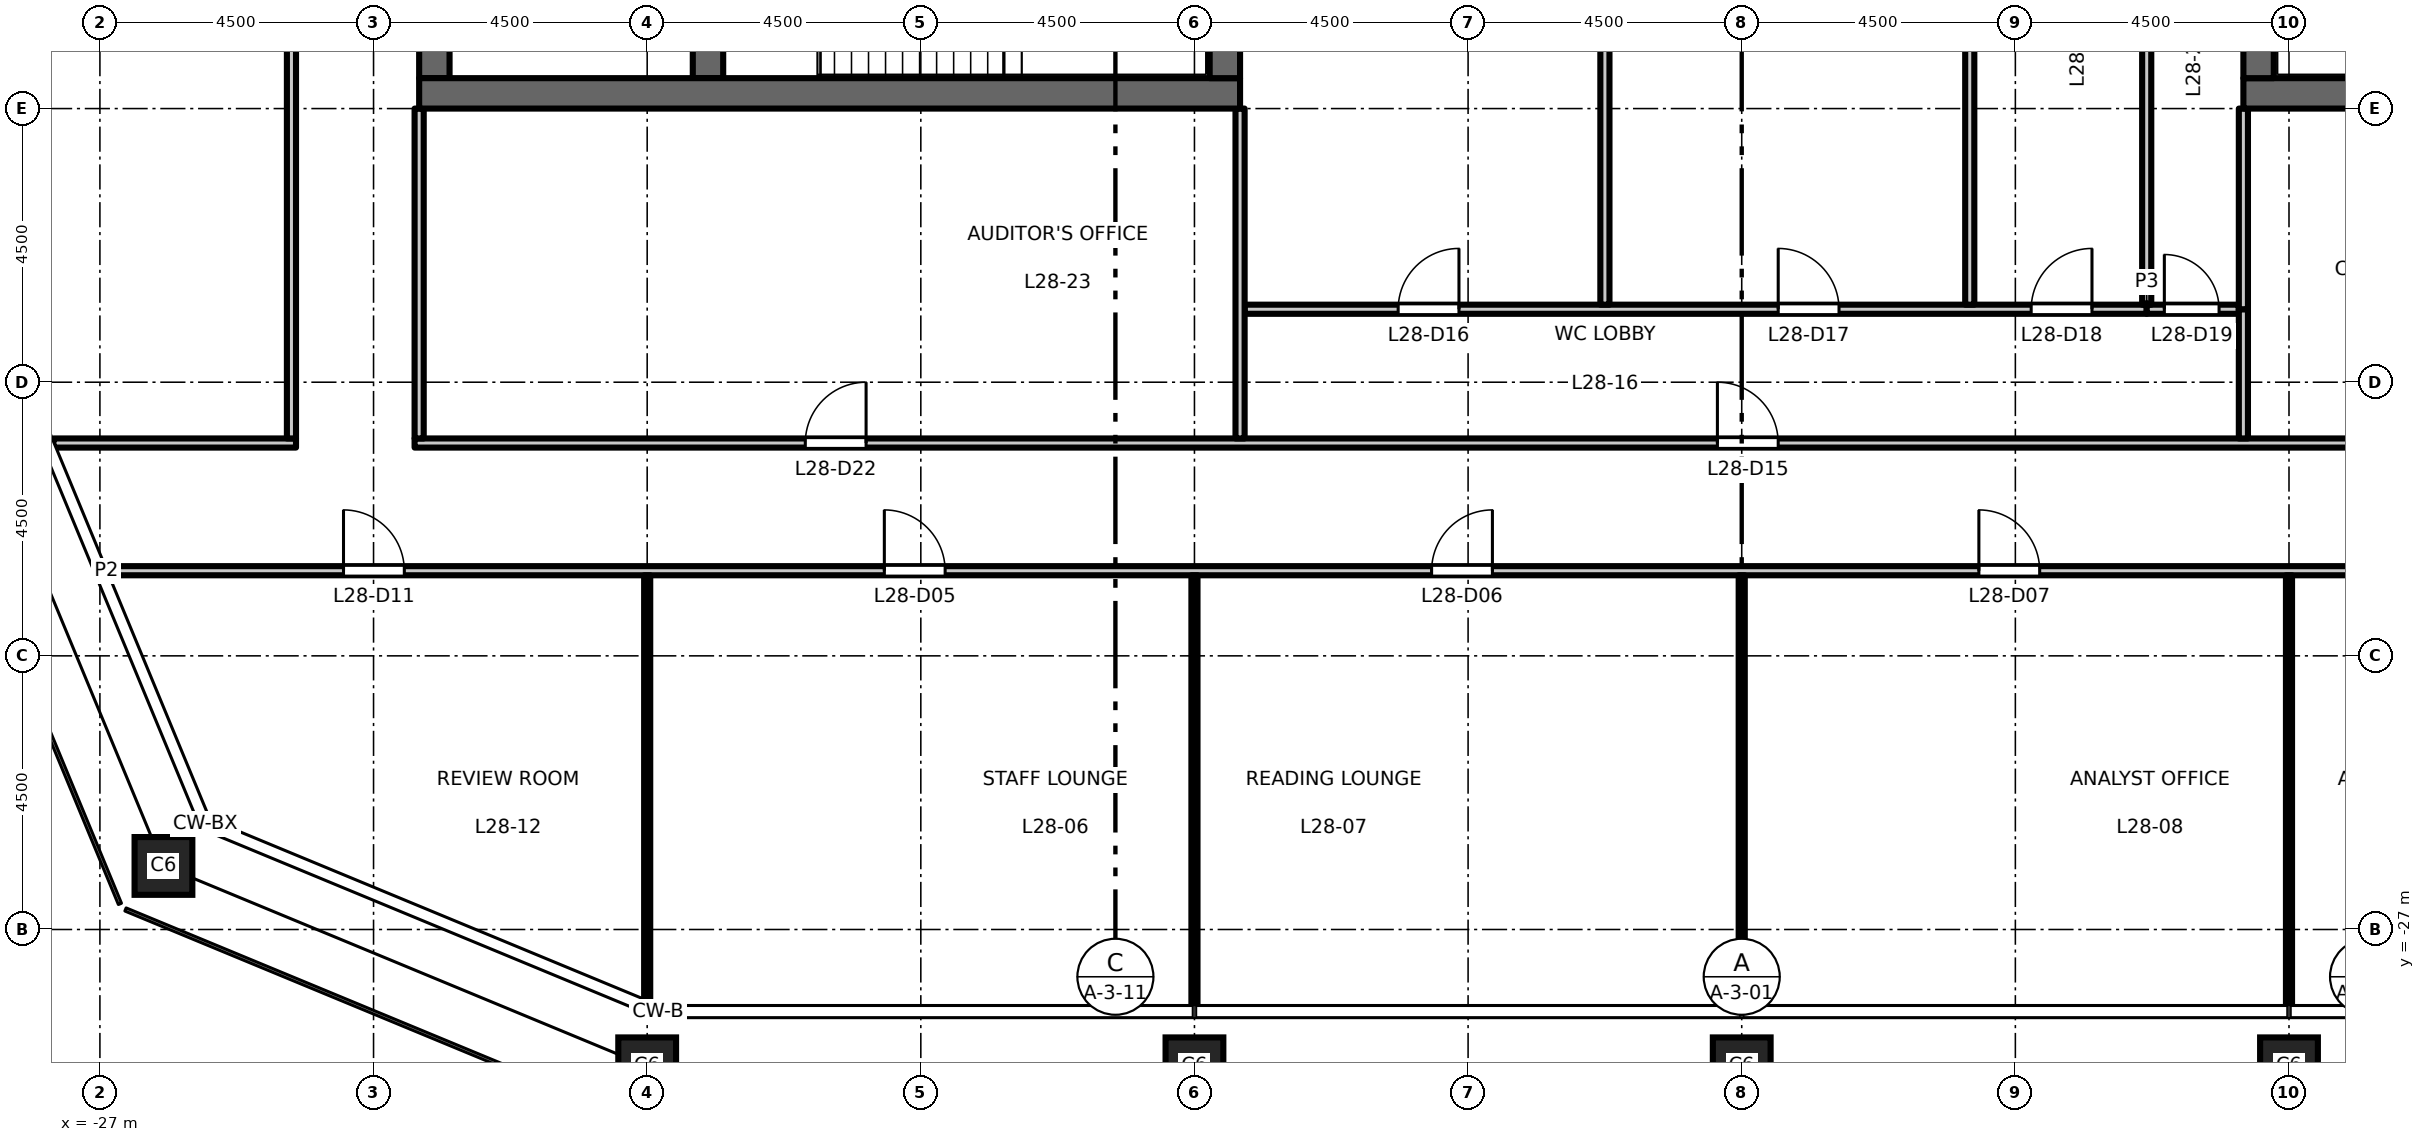
"""IFC4 building model, lengths in metres.
Left out: names, types, materials, properties, quantities, classifications, styles, units other than length and angle.
Written with IfcOpenShell. Run it as: python <this file> out.ifc"""

import sys

from ifc_helpers import new_model, si_unit, direction, frame, frame_2d, origin, origin_2d, place, context, subcontext, project, spatial, rectangle, hollow_rectangle, extrude, element, fill, save


model = new_model("IFC4")
c1 = context("Model", 3, precision=1e-05, world=origin(), true_north=direction((0.0, 1.0)))
c2 = subcontext(c1, "Body", "Model", "MODEL_VIEW")
j1 = project(units=[si_unit("LENGTHUNIT", "METRE"), si_unit("PLANEANGLEUNIT", "RADIAN")], contexts=[c1])
p1 = place(None, origin())
s1 = spatial("IfcSite", under=j1, at=p1, CompositionType="ELEMENT")
p2 = place(p1, origin())
s2 = spatial("IfcBuilding", under=s1, at=p2, CompositionType="ELEMENT")
p3 = place(p2, frame((0.0, 0.0, 131.7)))
s3 = spatial("IfcBuildingStorey", under=s2, at=p3, CompositionType="ELEMENT", Elevation=131.7)
for number, where, z_axis, x_axis in (
    (1, (-18.0, -29.25, 0.0), (0.0, 0.0, 1.0), (1.0, 0.0, 0.0)),
    (2, (-9.0, -29.25, 0.0), (0.0, 0.0, 1.0), (1.0, 0.0, 0.0)),
    (3, (0.0, -29.25, 0.0), (0.0, 0.0, 1.0), (1.0, 0.0, 0.0)),
    (4, (9.0, -29.25, 0.0), (0.0, 0.0, 1.0), (1.0, 0.0, 0.0)),
    (5, (-25.955, -25.955, 0.0), (0.0, 0.0, 1.0), (1.0, 0.0, 0.0)),
):
    element("IfcColumn", number, at=place(p3, frame(where, z_axis=z_axis, x_axis=x_axis)), inside=s3, PredefinedType="COLUMN", context=c2, shape_type="SweptSolid", body=[
        extrude(hollow_rectangle(XDim=0.95, YDim=0.95, WallThickness=0.055, at=origin_2d()), origin(), (0.0, 0.0, 1.0), 4.5),
    ])
p4 = place(p3, frame((-21.5, -13.0, 0.0), z_axis=(0.0, 0.0, 1.0), x_axis=(0.0, 1.0, 0.0)))
e6 = element("IfcWall", 6, at=p4, inside=s3, PredefinedType="SHEAR", context=c2, shape_type="SweptSolid", body=[
    extrude(rectangle(XDim=26.0, YDim=0.5, at=frame_2d((13.0, 0.0))), origin(), (0.0, 0.0, 1.0), 4.35),
])
p5 = place(p4, frame((16.825, 0.0, 0.0)))
e7 = element("IfcOpeningElement", 7, at=p5, cuts=e6, PredefinedType="OPENING", context=c2, shape_type="SweptSolid", body=[
    extrude(rectangle(XDim=1.8, YDim=2.1, at=frame_2d((0.9, 1.05))), frame((0.0, 0.26, 0.0), z_axis=(0.0, -1.0, 0.0), x_axis=(1.0, 0.0, 0.0)), (0.0, 0.0, 1.0), 0.52),
])
p6 = place(p4, frame((7.375, 0.0, 0.0)))
e8 = element("IfcOpeningElement", 8, at=p6, cuts=e6, PredefinedType="OPENING", context=c2, shape_type="SweptSolid", body=[
    extrude(rectangle(XDim=1.8, YDim=2.1, at=frame_2d((0.9, 1.05))), frame((0.0, 0.26, 0.0), z_axis=(0.0, -1.0, 0.0), x_axis=(1.0, 0.0, 0.0)), (0.0, 0.0, 1.0), 0.52),
])
p7 = place(p3, frame((-17.0, -13.0, 0.0), z_axis=(0.0, 0.0, 1.0), x_axis=(0.0, 1.0, 0.0)))
e9 = element("IfcWall", 9, at=p7, inside=s3, PredefinedType="SHEAR", context=c2, shape_type="SweptSolid", body=[
    extrude(rectangle(XDim=6.575, YDim=0.5, at=frame_2d((3.288, 0.0))), origin(), (0.0, 0.0, 1.0), 4.35),
])
p8 = place(p3, frame((-8.25, -13.25, 0.0), z_axis=(0.0, 0.0, 1.0), x_axis=(-1.0, 0.0, 0.0)))
e10 = element("IfcWall", 10, at=p8, inside=s3, PredefinedType="SHEAR", context=c2, shape_type="SweptSolid", body=[
    extrude(rectangle(XDim=13.5, YDim=0.5, at=frame_2d((6.75, 0.0))), origin(), (0.0, 0.0, 1.0), 4.35),
])
p9 = place(p3, frame((-8.5, -13.0, 0.0), z_axis=(0.0, 0.0, 1.0), x_axis=(0.0, 1.0, 0.0)))
e11 = element("IfcWall", 11, at=p9, inside=s3, PredefinedType="SHEAR", context=c2, shape_type="SweptSolid", body=[
    extrude(rectangle(XDim=26.0, YDim=0.5, at=frame_2d((13.0, 0.0))), origin(), (0.0, 0.0, 1.0), 4.35),
])
p10 = place(p3, frame((8.25, -13.25, 0.0), z_axis=(0.0, 0.0, 1.0), x_axis=(1.0, 0.0, 0.0)))
e12 = element("IfcWall", 12, at=p10, inside=s3, PredefinedType="SHEAR", context=c2, shape_type="SweptSolid", body=[
    extrude(rectangle(XDim=13.5, YDim=0.5, at=frame_2d((6.75, 0.0))), origin(), (0.0, 0.0, 1.0), 4.35),
])
p11 = place(p3, frame((8.5, -13.0, 0.0), z_axis=(0.0, 0.0, 1.0), x_axis=(0.0, 1.0, 0.0)))
e13 = element("IfcWall", 13, at=p11, inside=s3, PredefinedType="SHEAR", context=c2, shape_type="SweptSolid", body=[
    extrude(rectangle(XDim=26.0, YDim=0.5, at=frame_2d((13.0, 0.0))), origin(), (0.0, 0.0, 1.0), 4.35),
])
p12 = place(p3, frame((-26.894, -21.1, 0.0), z_axis=(0.0, 0.0, 1.0), x_axis=(1.0, 0.0, 0.0)))
e14 = element("IfcWall", 14, at=p12, inside=s3, PredefinedType="PARTITIONING", context=c2, shape_type="SweptSolid", body=[
    extrude(rectangle(XDim=53.788, YDim=0.15, at=frame_2d((26.894, 0.0))), origin(), (0.0, 0.0, 1.0), 4.35),
])
p13 = place(p12, frame((12.794, 0.0, 0.0)))
e15 = element("IfcOpeningElement", 15, at=p13, cuts=e14, PredefinedType="OPENING", context=c2, shape_type="SweptSolid", body=[
    extrude(rectangle(XDim=1.0, YDim=2.1, at=frame_2d((0.5, 1.05))), frame((0.0, 0.085, 0.0), z_axis=(0.0, -1.0, 0.0), x_axis=(1.0, 0.0, 0.0)), (0.0, 0.0, 1.0), 0.17),
])
p14 = place(p12, frame((21.794, 0.0, 0.0)))
e16 = element("IfcOpeningElement", 16, at=p14, cuts=e14, PredefinedType="OPENING", context=c2, shape_type="SweptSolid", body=[
    extrude(rectangle(XDim=1.0, YDim=2.1, at=frame_2d((0.5, 1.05))), frame((0.0, 0.085, 0.0), z_axis=(0.0, -1.0, 0.0), x_axis=(1.0, 0.0, 0.0)), (0.0, 0.0, 1.0), 0.17),
])
p15 = place(p12, frame((30.794, 0.0, 0.0)))
e17 = element("IfcOpeningElement", 17, at=p15, cuts=e14, PredefinedType="OPENING", context=c2, shape_type="SweptSolid", body=[
    extrude(rectangle(XDim=1.0, YDim=2.1, at=frame_2d((0.5, 1.05))), frame((0.0, 0.085, 0.0), z_axis=(0.0, -1.0, 0.0), x_axis=(1.0, 0.0, 0.0)), (0.0, 0.0, 1.0), 0.17),
])
p16 = place(p12, frame((39.794, 0.0, 0.0)))
e18 = element("IfcOpeningElement", 18, at=p16, cuts=e14, PredefinedType="OPENING", context=c2, shape_type="SweptSolid", body=[
    extrude(rectangle(XDim=1.0, YDim=2.1, at=frame_2d((0.5, 1.05))), frame((0.0, 0.085, 0.0), z_axis=(0.0, -1.0, 0.0), x_axis=(1.0, 0.0, 0.0)), (0.0, 0.0, 1.0), 0.17),
])
p17 = place(p12, frame((3.9, 0.0, 0.0)))
e19 = element("IfcOpeningElement", 19, at=p17, cuts=e14, PredefinedType="OPENING", context=c2, shape_type="SweptSolid", body=[
    extrude(rectangle(XDim=1.0, YDim=2.1, at=frame_2d((0.5, 1.05))), frame((0.0, 0.085, 0.0), z_axis=(0.0, -1.0, 0.0), x_axis=(1.0, 0.0, 0.0)), (0.0, 0.0, 1.0), 0.17),
])
p18 = place(p12, frame((48.794, 0.0, 0.0)))
e20 = element("IfcOpeningElement", 20, at=p18, cuts=e14, PredefinedType="OPENING", context=c2, shape_type="SweptSolid", body=[
    extrude(rectangle(XDim=1.0, YDim=2.1, at=frame_2d((0.5, 1.05))), frame((0.0, 0.085, 0.0), z_axis=(0.0, -1.0, 0.0), x_axis=(1.0, 0.0, 0.0)), (0.0, 0.0, 1.0), 0.17),
])
p19 = place(p3, frame((-27.764, -19.0, 0.0), z_axis=(0.0, 0.0, 1.0), x_axis=(1.0, 0.0, 0.0)))
e21 = element("IfcWall", 21, at=p19, inside=s3, PredefinedType="PARTITIONING", context=c2, shape_type="SweptSolid", body=[
    extrude(rectangle(XDim=3.989, YDim=0.15, at=frame_2d((1.995, 0.0))), origin(), (0.0, 0.0, 1.0), 4.35),
])
p20 = place(p3, frame((-21.825, -19.0, 0.0), z_axis=(0.0, 0.0, 1.0), x_axis=(1.0, 0.0, 0.0)))
e22 = element("IfcWall", 22, at=p20, inside=s3, PredefinedType="PARTITIONING", context=c2, shape_type="SweptSolid", body=[
    extrude(rectangle(XDim=43.65, YDim=0.15, at=frame_2d((21.825, 0.0))), origin(), (0.0, 0.0, 1.0), 4.35),
])
p21 = place(p20, frame((21.425, 0.0, 0.0)))
e23 = element("IfcOpeningElement", 23, at=p21, cuts=e22, PredefinedType="OPENING", context=c2, shape_type="SweptSolid", body=[
    extrude(rectangle(XDim=1.0, YDim=2.1, at=frame_2d((0.5, 1.05))), frame((0.0, 0.085, 0.0), z_axis=(0.0, -1.0, 0.0), x_axis=(1.0, 0.0, 0.0)), (0.0, 0.0, 1.0), 0.17),
])
p22 = place(p20, frame((6.425, 0.0, 0.0)))
e24 = element("IfcOpeningElement", 24, at=p22, cuts=e22, PredefinedType="OPENING", context=c2, shape_type="SweptSolid", body=[
    extrude(rectangle(XDim=1.0, YDim=2.1, at=frame_2d((0.5, 1.05))), frame((0.0, 0.085, 0.0), z_axis=(0.0, -1.0, 0.0), x_axis=(1.0, 0.0, 0.0)), (0.0, 0.0, 1.0), 0.17),
])
p23 = place(p20, frame((36.425, 0.0, 0.0)))
e25 = element("IfcOpeningElement", 25, at=p23, cuts=e22, PredefinedType="OPENING", context=c2, shape_type="SweptSolid", body=[
    extrude(rectangle(XDim=1.0, YDim=2.1, at=frame_2d((0.5, 1.05))), frame((0.0, 0.085, 0.0), z_axis=(0.0, -1.0, 0.0), x_axis=(1.0, 0.0, 0.0)), (0.0, 0.0, 1.0), 0.17),
])
p24 = place(p3, frame((-8.175, -16.8, 0.0), z_axis=(0.0, 0.0, 1.0), x_axis=(1.0, 0.0, 0.0)))
e26 = element("IfcWall", 26, at=p24, inside=s3, PredefinedType="PARTITIONING", context=c2, shape_type="SweptSolid", body=[
    extrude(rectangle(XDim=14.835, YDim=0.15, at=frame_2d((7.417, 0.0))), origin(), (0.0, 0.0, 1.0), 4.35),
])
p25 = place(p24, frame((2.525, 0.0, 0.0)))
e27 = element("IfcOpeningElement", 27, at=p25, cuts=e26, PredefinedType="OPENING", context=c2, shape_type="SweptSolid", body=[
    extrude(rectangle(XDim=1.0, YDim=2.1, at=frame_2d((0.5, 1.05))), frame((0.0, 0.085, 0.0), z_axis=(0.0, -1.0, 0.0), x_axis=(1.0, 0.0, 0.0)), (0.0, 0.0, 1.0), 0.17),
])
p26 = place(p24, frame((8.775, 0.0, 0.0)))
e28 = element("IfcOpeningElement", 28, at=p26, cuts=e26, PredefinedType="OPENING", context=c2, shape_type="SweptSolid", body=[
    extrude(rectangle(XDim=1.0, YDim=2.1, at=frame_2d((0.5, 1.05))), frame((0.0, 0.085, 0.0), z_axis=(0.0, -1.0, 0.0), x_axis=(1.0, 0.0, 0.0)), (0.0, 0.0, 1.0), 0.17),
])
p27 = place(p24, frame((12.935, 0.0, 0.0)))
e29 = element("IfcOpeningElement", 29, at=p27, cuts=e26, PredefinedType="OPENING", context=c2, shape_type="SweptSolid", body=[
    extrude(rectangle(XDim=1.0, YDim=2.1, at=frame_2d((0.5, 1.05))), frame((0.0, 0.085, 0.0), z_axis=(0.0, -1.0, 0.0), x_axis=(1.0, 0.0, 0.0)), (0.0, 0.0, 1.0), 0.17),
])
p28 = place(p3, frame((6.66, -16.8, 0.0), z_axis=(0.0, 0.0, 1.0), x_axis=(1.0, 0.0, 0.0)))
e30 = element("IfcWall", 30, at=p28, inside=s3, PredefinedType="PARTITIONING", context=c2, shape_type="SweptSolid", body=[
    extrude(rectangle(XDim=1.515, YDim=0.15, at=frame_2d((0.758, 0.0))), origin(), (0.0, 0.0, 1.0), 4.35),
])
p29 = place(p28, frame((0.29, 0.0, 0.0)))
e31 = element("IfcOpeningElement", 31, at=p29, cuts=e30, PredefinedType="OPENING", context=c2, shape_type="SweptSolid", body=[
    extrude(rectangle(XDim=0.9, YDim=2.1, at=frame_2d((0.45, 1.05))), frame((0.0, 0.085, 0.0), z_axis=(0.0, -1.0, 0.0), x_axis=(1.0, 0.0, 0.0)), (0.0, 0.0, 1.0), 0.17),
])
p30 = place(p3, frame((-23.85, -18.925, 0.0), z_axis=(0.0, 0.0, 1.0), x_axis=(0.0, 1.0, 0.0)))
e32 = element("IfcWall", 32, at=p30, inside=s3, PredefinedType="PARTITIONING", context=c2, shape_type="SweptSolid", body=[
    extrude(rectangle(XDim=37.85, YDim=0.15, at=frame_2d((18.925, 0.0))), origin(), (0.0, 0.0, 1.0), 4.35),
])
p31 = place(p30, frame((18.525, 0.0, 0.0)))
e33 = element("IfcOpeningElement", 33, at=p31, cuts=e32, PredefinedType="OPENING", context=c2, shape_type="SweptSolid", body=[
    extrude(rectangle(XDim=1.0, YDim=2.1, at=frame_2d((0.5, 1.05))), frame((0.0, 0.085, 0.0), z_axis=(0.0, -1.0, 0.0), x_axis=(1.0, 0.0, 0.0)), (0.0, 0.0, 1.0), 0.17),
])
p32 = place(p3, frame((-21.75, -18.925, 0.0), z_axis=(0.0, 0.0, 1.0), x_axis=(0.0, 1.0, 0.0)))
e34 = element("IfcWall", 34, at=p32, inside=s3, PredefinedType="PARTITIONING", context=c2, shape_type="SweptSolid", body=[
    extrude(rectangle(XDim=5.425, YDim=0.15, at=frame_2d((2.712, 0.0))), origin(), (0.0, 0.0, 1.0), 4.35),
])
p33 = place(p3, frame((-18.0, -28.178, 0.0), z_axis=(0.0, 0.0, 1.0), x_axis=(0.0, 1.0, 0.0)))
e35 = element("IfcWall", 35, at=p33, inside=s3, PredefinedType="PARTITIONING", context=c2, shape_type="SweptSolid", body=[
    extrude(rectangle(XDim=7.003, YDim=0.1, at=frame_2d((3.501, 0.0))), origin(), (0.0, 0.0, 1.0), 3.45),
])
p34 = place(p3, frame((-9.0, -28.26, 0.0), z_axis=(0.0, 0.0, 1.0), x_axis=(0.0, 1.0, 0.0)))
e36 = element("IfcWall", 36, at=p34, inside=s3, PredefinedType="PARTITIONING", context=c2, shape_type="SweptSolid", body=[
    extrude(rectangle(XDim=7.085, YDim=0.1, at=frame_2d((3.542, 0.0))), origin(), (0.0, 0.0, 1.0), 3.45),
])
p35 = place(p3, frame((-8.25, -18.925, 0.0), z_axis=(0.0, 0.0, 1.0), x_axis=(0.0, 1.0, 0.0)))
e37 = element("IfcWall", 37, at=p35, inside=s3, PredefinedType="PARTITIONING", context=c2, shape_type="SweptSolid", body=[
    extrude(rectangle(XDim=5.425, YDim=0.15, at=frame_2d((2.712, 0.0))), origin(), (0.0, 0.0, 1.0), 4.35),
])
p36 = place(p3, frame((-2.25, -16.725, 0.0), z_axis=(0.0, 0.0, 1.0), x_axis=(0.0, 1.0, 0.0)))
e38 = element("IfcWall", 38, at=p36, inside=s3, PredefinedType="PARTITIONING", context=c2, shape_type="SweptSolid", body=[
    extrude(rectangle(XDim=8.355, YDim=0.15, at=frame_2d((4.177, 0.0))), origin(), (0.0, 0.0, 1.0), 4.35),
])
p37 = place(p3, frame((0.0, -28.26, 0.0), z_axis=(0.0, 0.0, 1.0), x_axis=(0.0, 1.0, 0.0)))
e39 = element("IfcWall", 39, at=p37, inside=s3, PredefinedType="PARTITIONING", context=c2, shape_type="SweptSolid", body=[
    extrude(rectangle(XDim=7.085, YDim=0.1, at=frame_2d((3.542, 0.0))), origin(), (0.0, 0.0, 1.0), 3.45),
])
p38 = place(p3, frame((3.75, -16.725, 0.0), z_axis=(0.0, 0.0, 1.0), x_axis=(0.0, 1.0, 0.0)))
e40 = element("IfcWall", 40, at=p38, inside=s3, PredefinedType="PARTITIONING", context=c2, shape_type="SweptSolid", body=[
    extrude(rectangle(XDim=8.355, YDim=0.15, at=frame_2d((4.177, 0.0))), origin(), (0.0, 0.0, 1.0), 4.35),
])
p39 = place(p3, frame((6.66, -16.725, 0.0), z_axis=(0.0, 0.0, 1.0), x_axis=(0.0, 1.0, 0.0)))
e41 = element("IfcWall", 41, at=p39, inside=s3, PredefinedType="PARTITIONING", context=c2, shape_type="SweptSolid", body=[
    extrude(rectangle(XDim=8.598, YDim=0.15, at=frame_2d((4.299, 0.0))), origin(), (0.0, 0.0, 1.0), 4.35),
])
p40 = place(p3, frame((8.25, -18.925, 0.0), z_axis=(0.0, 0.0, 1.0), x_axis=(0.0, 1.0, 0.0)))
e42 = element("IfcWall", 42, at=p40, inside=s3, PredefinedType="PARTITIONING", context=c2, shape_type="SweptSolid", body=[
    extrude(rectangle(XDim=2.125, YDim=0.15, at=frame_2d((1.062, 0.0))), origin(), (0.0, 0.0, 1.0), 4.35),
])
p41 = place(p3, frame((8.25, -16.8, 0.0), z_axis=(0.0, 0.0, 1.0), x_axis=(0.0, 1.0, 0.0)))
e43 = element("IfcWall", 43, at=p41, inside=s3, PredefinedType="PARTITIONING", context=c2, shape_type="SweptSolid", body=[
    extrude(rectangle(XDim=3.3, YDim=0.15, at=frame_2d((1.65, 0.0))), origin(), (0.0, 0.0, 1.0), 4.35),
])
p42 = place(p3, frame((9.0, -28.26, 0.0), z_axis=(0.0, 0.0, 1.0), x_axis=(0.0, 1.0, 0.0)))
e44 = element("IfcWall", 44, at=p42, inside=s3, PredefinedType="PARTITIONING", context=c2, shape_type="SweptSolid", body=[
    extrude(rectangle(XDim=7.085, YDim=0.1, at=frame_2d((3.542, 0.0))), origin(), (0.0, 0.0, 1.0), 3.45),
])
p43 = place(p13, origin())
e45 = element("IfcDoor", 45, at=p43, inside=s3, OperationType="SINGLE_SWING_LEFT", PredefinedType="DOOR", context=c2, shape_type="SweptSolid", body=[
    extrude(rectangle(XDim=1.0, YDim=2.1, at=frame_2d((0.5, 1.05))), frame((0.0, 0.025, 0.0), z_axis=(0.0, -1.0, 0.0), x_axis=(1.0, 0.0, 0.0)), (0.0, 0.0, 1.0), 0.05),
])
fill(e15, e45)
p44 = place(p14, origin())
e46 = element("IfcDoor", 46, at=p44, inside=s3, OperationType="SINGLE_SWING_RIGHT", PredefinedType="DOOR", context=c2, shape_type="SweptSolid", body=[
    extrude(rectangle(XDim=1.0, YDim=2.1, at=frame_2d((0.5, 1.05))), frame((0.0, 0.025, 0.0), z_axis=(0.0, -1.0, 0.0), x_axis=(1.0, 0.0, 0.0)), (0.0, 0.0, 1.0), 0.05),
])
fill(e16, e46)
p45 = place(p15, origin())
e47 = element("IfcDoor", 47, at=p45, inside=s3, OperationType="SINGLE_SWING_LEFT", PredefinedType="DOOR", context=c2, shape_type="SweptSolid", body=[
    extrude(rectangle(XDim=1.0, YDim=2.1, at=frame_2d((0.5, 1.05))), frame((0.0, 0.025, 0.0), z_axis=(0.0, -1.0, 0.0), x_axis=(1.0, 0.0, 0.0)), (0.0, 0.0, 1.0), 0.05),
])
fill(e17, e47)
p46 = place(p17, origin())
e48 = element("IfcDoor", 48, at=p46, inside=s3, OperationType="SINGLE_SWING_LEFT", PredefinedType="DOOR", context=c2, shape_type="SweptSolid", body=[
    extrude(rectangle(XDim=1.0, YDim=2.1, at=frame_2d((0.5, 1.05))), frame((0.0, 0.025, 0.0), z_axis=(0.0, -1.0, 0.0), x_axis=(1.0, 0.0, 0.0)), (0.0, 0.0, 1.0), 0.05),
])
fill(e19, e48)
p47 = place(p21, origin())
e49 = element("IfcDoor", 49, at=p47, inside=s3, OperationType="SINGLE_SWING_LEFT", PredefinedType="DOOR", context=c2, shape_type="SweptSolid", body=[
    extrude(rectangle(XDim=1.0, YDim=2.1, at=frame_2d((0.5, 1.05))), frame((0.0, 0.025, 0.0), z_axis=(0.0, -1.0, 0.0), x_axis=(1.0, 0.0, 0.0)), (0.0, 0.0, 1.0), 0.05),
])
fill(e23, e49)
p48 = place(p25, origin())
e50 = element("IfcDoor", 50, at=p48, inside=s3, OperationType="SINGLE_SWING_RIGHT", PredefinedType="DOOR", context=c2, shape_type="SweptSolid", body=[
    extrude(rectangle(XDim=1.0, YDim=2.1, at=frame_2d((0.5, 1.05))), frame((0.0, 0.025, 0.0), z_axis=(0.0, -1.0, 0.0), x_axis=(1.0, 0.0, 0.0)), (0.0, 0.0, 1.0), 0.05),
])
fill(e27, e50)
p49 = place(p26, origin())
e51 = element("IfcDoor", 51, at=p49, inside=s3, OperationType="SINGLE_SWING_LEFT", PredefinedType="DOOR", context=c2, shape_type="SweptSolid", body=[
    extrude(rectangle(XDim=1.0, YDim=2.1, at=frame_2d((0.5, 1.05))), frame((0.0, 0.025, 0.0), z_axis=(0.0, -1.0, 0.0), x_axis=(1.0, 0.0, 0.0)), (0.0, 0.0, 1.0), 0.05),
])
fill(e28, e51)
p50 = place(p27, origin())
e52 = element("IfcDoor", 52, at=p50, inside=s3, OperationType="SINGLE_SWING_RIGHT", PredefinedType="DOOR", context=c2, shape_type="SweptSolid", body=[
    extrude(rectangle(XDim=1.0, YDim=2.1, at=frame_2d((0.5, 1.05))), frame((0.0, 0.025, 0.0), z_axis=(0.0, -1.0, 0.0), x_axis=(1.0, 0.0, 0.0)), (0.0, 0.0, 1.0), 0.05),
])
fill(e29, e52)
p51 = place(p29, origin())
e53 = element("IfcDoor", 53, at=p51, inside=s3, OperationType="SINGLE_SWING_LEFT", PredefinedType="DOOR", context=c2, shape_type="SweptSolid", body=[
    extrude(rectangle(XDim=0.9, YDim=2.1, at=frame_2d((0.45, 1.05))), frame((0.0, 0.025, 0.0), z_axis=(0.0, -1.0, 0.0), x_axis=(1.0, 0.0, 0.0)), (0.0, 0.0, 1.0), 0.05),
])
fill(e31, e53)
p52 = place(p22, origin())
e54 = element("IfcDoor", 54, at=p52, inside=s3, OperationType="SINGLE_SWING_RIGHT", PredefinedType="DOOR", context=c2, shape_type="SweptSolid", body=[
    extrude(rectangle(XDim=1.0, YDim=2.1, at=frame_2d((0.5, 1.05))), frame((0.0, 0.025, 0.0), z_axis=(0.0, -1.0, 0.0), x_axis=(1.0, 0.0, 0.0)), (0.0, 0.0, 1.0), 0.05),
])
fill(e24, e54)
save(model, sys.argv[1])
